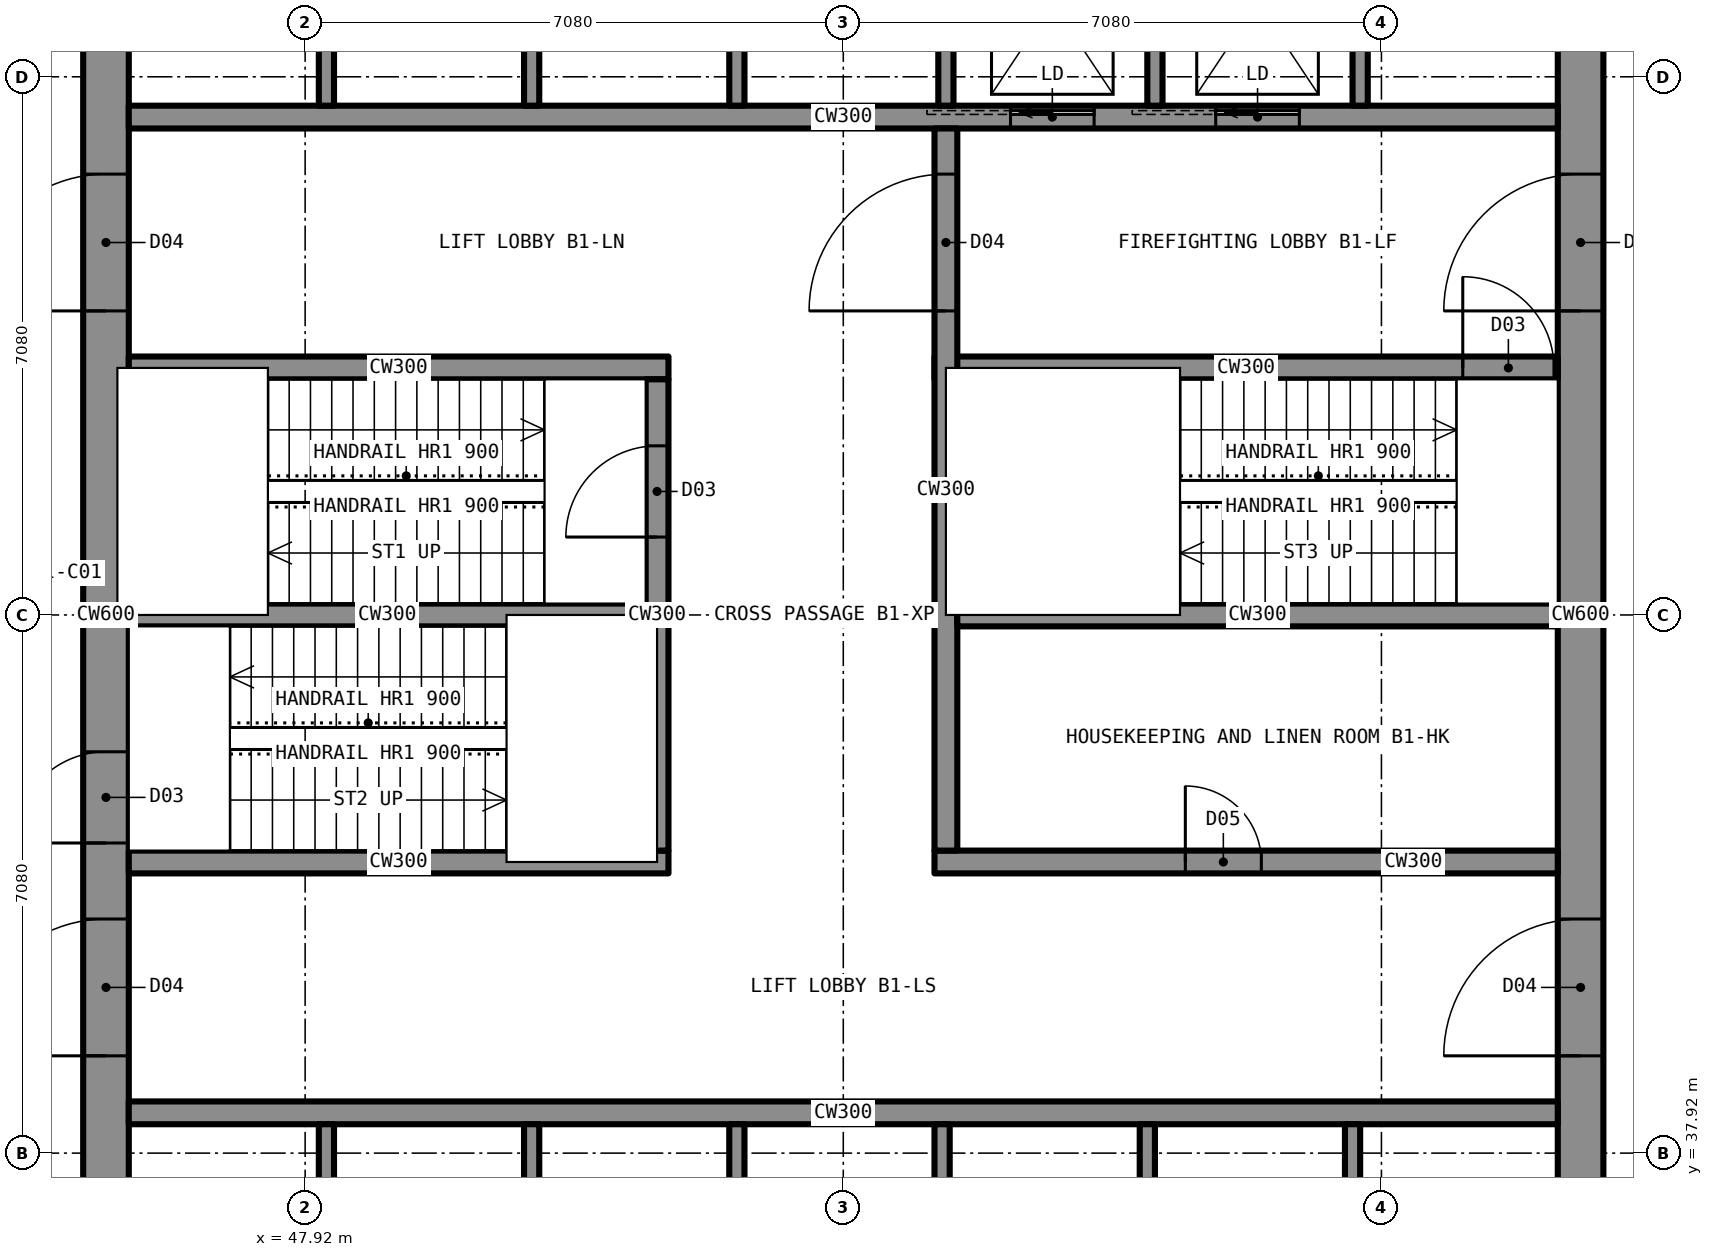
"""IFC4 building model, lengths in metres.
Left out: names, types, materials, properties, quantities, classifications, styles, units other than length and angle.
Written with IfcOpenShell. Run it as: python <this file> out.ifc"""

import sys

from ifc_helpers import new_model, si_unit, direction, frame, frame_2d, origin, place, context, subcontext, project, spatial, rectangle, extrude, element, fill, save


model = new_model("IFC4")
c1 = context("Model", 3, precision=1e-05, world=origin(), true_north=direction((0.0, 1.0)))
c2 = subcontext(c1, "Body", "Model", "MODEL_VIEW")
j1 = project(units=[si_unit("LENGTHUNIT", "METRE"), si_unit("PLANEANGLEUNIT", "RADIAN")], contexts=[c1])
p1 = place(None, origin())
s1 = spatial("IfcSite", under=j1, at=p1, CompositionType="ELEMENT")
p2 = place(p1, origin())
s2 = spatial("IfcBuilding", under=s1, at=p2, CompositionType="ELEMENT")
p3 = place(p2, frame((0.0, 0.0, -5.0)))
s3 = spatial("IfcBuildingStorey", under=s2, at=p3, CompositionType="ELEMENT", Elevation=-5.0)
p4 = place(p3, frame((64.7, 35.6, 0.0), z_axis=(0.0, 0.0, 1.0), x_axis=(0.0, 1.0, 0.0)))
e1 = element("IfcWall", 1, at=p4, inside=s3, PredefinedType="SHEAR", context=c2, shape_type="SweptSolid", body=[
    extrude(rectangle(XDim=18.8, YDim=0.6, at=frame_2d((9.4, 0.0))), origin(), (0.0, 0.0, 1.0), 5.0),
])
p5 = place(p4, frame((13.4, 0.0, 0.0)))
e2 = element("IfcOpeningElement", 2, at=p5, cuts=e1, PredefinedType="OPENING", context=c2, shape_type="SweptSolid", body=[
    extrude(rectangle(XDim=1.8, YDim=2.2, at=frame_2d((0.9, 1.1))), frame((0.0, 0.31, 0.0), z_axis=(0.0, -1.0, 0.0), x_axis=(1.0, 0.0, 0.0)), (0.0, 0.0, 1.0), 0.62),
])
p6 = place(p4, frame((3.6, 0.0, 0.0)))
e3 = element("IfcOpeningElement", 3, at=p6, cuts=e1, PredefinedType="OPENING", context=c2, shape_type="SweptSolid", body=[
    extrude(rectangle(XDim=1.8, YDim=2.2, at=frame_2d((0.9, 1.1))), frame((0.0, 0.31, 0.0), z_axis=(0.0, -1.0, 0.0), x_axis=(1.0, 0.0, 0.0)), (0.0, 0.0, 1.0), 0.62),
])
p7 = place(p3, frame((45.3, 35.6, 0.0), z_axis=(0.0, 0.0, 1.0), x_axis=(0.0, 1.0, 0.0)))
e4 = element("IfcWall", 4, at=p7, inside=s3, PredefinedType="SHEAR", context=c2, shape_type="SweptSolid", body=[
    extrude(rectangle(XDim=18.8, YDim=0.6, at=frame_2d((9.4, 0.0))), origin(), (0.0, 0.0, 1.0), 5.0),
])
p8 = place(p7, frame((13.4, 0.0, 0.0)))
e5 = element("IfcOpeningElement", 5, at=p8, cuts=e4, PredefinedType="OPENING", context=c2, shape_type="SweptSolid", body=[
    extrude(rectangle(XDim=1.8, YDim=2.2, at=frame_2d((0.9, 1.1))), frame((0.0, 0.31, 0.0), z_axis=(0.0, -1.0, 0.0), x_axis=(1.0, 0.0, 0.0)), (0.0, 0.0, 1.0), 0.62),
])
p9 = place(p7, frame((3.6, 0.0, 0.0)))
e6 = element("IfcOpeningElement", 6, at=p9, cuts=e4, PredefinedType="OPENING", context=c2, shape_type="SweptSolid", body=[
    extrude(rectangle(XDim=1.8, YDim=2.2, at=frame_2d((0.9, 1.1))), frame((0.0, 0.31, 0.0), z_axis=(0.0, -1.0, 0.0), x_axis=(1.0, 0.0, 0.0)), (0.0, 0.0, 1.0), 0.62),
])
p10 = place(p7, frame((6.4, 0.0, 0.0)))
e7 = element("IfcOpeningElement", 7, at=p10, cuts=e4, PredefinedType="OPENING", context=c2, shape_type="SweptSolid", body=[
    extrude(rectangle(XDim=1.2, YDim=2.2, at=frame_2d((0.6, 1.1))), frame((0.0, 0.31, 0.0), z_axis=(0.0, -1.0, 0.0), x_axis=(1.0, 0.0, 0.0)), (0.0, 0.0, 1.0), 0.62),
])
p11 = place(p3, frame((45.6, 51.55, 0.0), z_axis=(0.0, 0.0, 1.0), x_axis=(1.0, 0.0, 0.0)))
e8 = element("IfcWall", 8, at=p11, inside=s3, PredefinedType="SHEAR", context=c2, shape_type="SweptSolid", body=[
    extrude(rectangle(XDim=18.8, YDim=0.3, at=frame_2d((9.4, 0.0))), origin(), (0.0, 0.0, 1.0), 5.0),
])
p12 = place(p11, frame((11.6, 0.0, 0.0)))
e9 = element("IfcOpeningElement", 9, at=p12, cuts=e8, PredefinedType="OPENING", context=c2, shape_type="SweptSolid", body=[
    extrude(rectangle(XDim=1.1, YDim=2.2, at=frame_2d((0.55, 1.1))), frame((0.0, 0.16, 0.0), z_axis=(0.0, -1.0, 0.0), x_axis=(1.0, 0.0, 0.0)), (0.0, 0.0, 1.0), 0.32),
])
p13 = place(p11, frame((14.3, 0.0, 0.0)))
e10 = element("IfcOpeningElement", 10, at=p13, cuts=e8, PredefinedType="OPENING", context=c2, shape_type="SweptSolid", body=[
    extrude(rectangle(XDim=1.1, YDim=2.2, at=frame_2d((0.55, 1.1))), frame((0.0, 0.16, 0.0), z_axis=(0.0, -1.0, 0.0), x_axis=(1.0, 0.0, 0.0)), (0.0, 0.0, 1.0), 0.32),
])
p14 = place(p3, frame((45.6, 38.45, 0.0), z_axis=(0.0, 0.0, 1.0), x_axis=(1.0, 0.0, 0.0)))
e11 = element("IfcWall", 11, at=p14, inside=s3, PredefinedType="SHEAR", context=c2, shape_type="SweptSolid", body=[
    extrude(rectangle(XDim=18.8, YDim=0.3, at=frame_2d((9.4, 0.0))), origin(), (0.0, 0.0, 1.0), 5.0),
])
p15 = place(p3, frame((45.6, 48.25, 0.0), z_axis=(0.0, 0.0, 1.0), x_axis=(1.0, 0.0, 0.0)))
e12 = element("IfcWall", 12, at=p15, inside=s3, PredefinedType="SHEAR", context=c2, shape_type="SweptSolid", body=[
    extrude(rectangle(XDim=7.1, YDim=0.3, at=frame_2d((3.55, 0.0))), origin(), (0.0, 0.0, 1.0), 5.0),
])
p16 = place(p3, frame((56.2, 48.25, 0.0), z_axis=(0.0, 0.0, 1.0), x_axis=(1.0, 0.0, 0.0)))
e13 = element("IfcWall", 13, at=p16, inside=s3, PredefinedType="SHEAR", context=c2, shape_type="SweptSolid", body=[
    extrude(rectangle(XDim=8.2, YDim=0.3, at=frame_2d((4.1, 0.0))), origin(), (0.0, 0.0, 1.0), 5.0),
])
p17 = place(p16, frame((6.95, 0.0, 0.0)))
e14 = element("IfcOpeningElement", 14, at=p17, cuts=e13, PredefinedType="OPENING", context=c2, shape_type="SweptSolid", body=[
    extrude(rectangle(XDim=1.2, YDim=2.2, at=frame_2d((0.6, 1.1))), frame((0.0, 0.16, 0.0), z_axis=(0.0, -1.0, 0.0), x_axis=(1.0, 0.0, 0.0)), (0.0, 0.0, 1.0), 0.32),
])
p18 = place(p3, frame((45.6, 41.75, 0.0), z_axis=(0.0, 0.0, 1.0), x_axis=(1.0, 0.0, 0.0)))
e15 = element("IfcWall", 15, at=p18, inside=s3, PredefinedType="SHEAR", context=c2, shape_type="SweptSolid", body=[
    extrude(rectangle(XDim=7.1, YDim=0.3, at=frame_2d((3.55, 0.0))), origin(), (0.0, 0.0, 1.0), 5.0),
])
p19 = place(p3, frame((56.2, 41.75, 0.0), z_axis=(0.0, 0.0, 1.0), x_axis=(1.0, 0.0, 0.0)))
e16 = element("IfcWall", 16, at=p19, inside=s3, PredefinedType="SHEAR", context=c2, shape_type="SweptSolid", body=[
    extrude(rectangle(XDim=8.2, YDim=0.3, at=frame_2d((4.1, 0.0))), origin(), (0.0, 0.0, 1.0), 5.0),
])
p20 = place(p19, frame((3.3, 0.0, 0.0)))
e17 = element("IfcOpeningElement", 17, at=p20, cuts=e16, PredefinedType="OPENING", context=c2, shape_type="SweptSolid", body=[
    extrude(rectangle(XDim=1.0, YDim=2.1, at=frame_2d((0.5, 1.05))), frame((0.0, 0.16, 0.0), z_axis=(0.0, -1.0, 0.0), x_axis=(1.0, 0.0, 0.0)), (0.0, 0.0, 1.0), 0.32),
])
p21 = place(p3, frame((52.55, 41.9, 0.0), z_axis=(0.0, 0.0, 1.0), x_axis=(0.0, 1.0, 0.0)))
e18 = element("IfcWall", 18, at=p21, inside=s3, PredefinedType="SHEAR", context=c2, shape_type="SweptSolid", body=[
    extrude(rectangle(XDim=6.2, YDim=0.3, at=frame_2d((3.1, 0.0))), origin(), (0.0, 0.0, 1.0), 5.0),
])
p22 = place(p21, frame((4.125, 0.0, 0.0)))
e19 = element("IfcOpeningElement", 19, at=p22, cuts=e18, PredefinedType="OPENING", context=c2, shape_type="SweptSolid", body=[
    extrude(rectangle(XDim=1.2, YDim=2.2, at=frame_2d((0.6, 1.1))), frame((0.0, 0.16, 0.0), z_axis=(0.0, -1.0, 0.0), x_axis=(1.0, 0.0, 0.0)), (0.0, 0.0, 1.0), 0.32),
])
p23 = place(p3, frame((56.35, 41.9, 0.0), z_axis=(0.0, 0.0, 1.0), x_axis=(0.0, 1.0, 0.0)))
e20 = element("IfcWall", 20, at=p23, inside=s3, PredefinedType="SHEAR", context=c2, shape_type="SweptSolid", body=[
    extrude(rectangle(XDim=9.5, YDim=0.3, at=frame_2d((4.75, 0.0))), origin(), (0.0, 0.0, 1.0), 5.0),
])
p24 = place(p23, frame((7.1, 0.0, 0.0)))
e21 = element("IfcOpeningElement", 21, at=p24, cuts=e20, PredefinedType="OPENING", context=c2, shape_type="SweptSolid", body=[
    extrude(rectangle(XDim=1.8, YDim=2.2, at=frame_2d((0.9, 1.1))), frame((0.0, 0.16, 0.0), z_axis=(0.0, -1.0, 0.0), x_axis=(1.0, 0.0, 0.0)), (0.0, 0.0, 1.0), 0.32),
])
p25 = place(p3, frame((45.6, 45.0, 0.0), z_axis=(0.0, 0.0, 1.0), x_axis=(1.0, 0.0, 0.0)))
e22 = element("IfcWall", 22, at=p25, inside=s3, PredefinedType="SHEAR", context=c2, shape_type="SweptSolid", body=[
    extrude(rectangle(XDim=6.8, YDim=0.3, at=frame_2d((3.4, 0.0))), origin(), (0.0, 0.0, 1.0), 5.0),
])
p26 = place(p3, frame((56.5, 45.0, 0.0), z_axis=(0.0, 0.0, 1.0), x_axis=(1.0, 0.0, 0.0)))
e23 = element("IfcWall", 23, at=p26, inside=s3, PredefinedType="SHEAR", context=c2, shape_type="SweptSolid", body=[
    extrude(rectangle(XDim=7.9, YDim=0.3, at=frame_2d((3.95, 0.0))), origin(), (0.0, 0.0, 1.0), 5.0),
])
for number, where, z_axis, x_axis in (
    (24, (48.2, 51.7, 0.0), (0.0, 0.0, 1.0), (0.0, 1.0, 0.0)),
    (25, (50.9, 51.7, 0.0), (0.0, 0.0, 1.0), (0.0, 1.0, 0.0)),
    (26, (53.6, 51.7, 0.0), (0.0, 0.0, 1.0), (0.0, 1.0, 0.0)),
    (27, (59.1, 51.7, 0.0), (0.0, 0.0, 1.0), (0.0, 1.0, 0.0)),
    (28, (61.8, 51.7, 0.0), (0.0, 0.0, 1.0), (0.0, 1.0, 0.0)),
    (29, (56.35, 51.7, 0.0), (0.0, 0.0, 1.0), (0.0, 1.0, 0.0)),
    (30, (48.2, 35.6, 0.0), (0.0, 0.0, 1.0), (0.0, 1.0, 0.0)),
    (31, (50.9, 35.6, 0.0), (0.0, 0.0, 1.0), (0.0, 1.0, 0.0)),
    (32, (53.6, 35.6, 0.0), (0.0, 0.0, 1.0), (0.0, 1.0, 0.0)),
    (33, (56.3, 35.6, 0.0), (0.0, 0.0, 1.0), (0.0, 1.0, 0.0)),
    (34, (59.0, 35.6, 0.0), (0.0, 0.0, 1.0), (0.0, 1.0, 0.0)),
    (35, (61.7, 35.6, 0.0), (0.0, 0.0, 1.0), (0.0, 1.0, 0.0)),
):
    element("IfcWall", number, at=place(p3, frame(where, z_axis=z_axis, x_axis=x_axis)), inside=s3, PredefinedType="PARTITIONING", context=c2, shape_type="SweptSolid", body=[
        extrude(rectangle(XDim=2.7, YDim=0.2, at=frame_2d((1.35, 0.0))), origin(), (0.0, 0.0, 1.0), 4.6),
    ])
p27 = place(p8, origin())
e36 = element("IfcDoor", 36, at=p27, inside=s3, OperationType="DOUBLE_DOOR_SINGLE_SWING", PredefinedType="DOOR", context=c2, shape_type="SweptSolid", body=[
    extrude(rectangle(XDim=1.8, YDim=2.2, at=frame_2d((0.9, 1.1))), frame((0.0, 0.025, 0.0), z_axis=(0.0, -1.0, 0.0), x_axis=(1.0, 0.0, 0.0)), (0.0, 0.0, 1.0), 0.05),
])
fill(e5, e36)
p28 = place(p9, origin())
e37 = element("IfcDoor", 37, at=p28, inside=s3, OperationType="DOUBLE_DOOR_SINGLE_SWING", PredefinedType="DOOR", context=c2, shape_type="SweptSolid", body=[
    extrude(rectangle(XDim=1.8, YDim=2.2, at=frame_2d((0.9, 1.1))), frame((0.0, 0.025, 0.0), z_axis=(0.0, -1.0, 0.0), x_axis=(1.0, 0.0, 0.0)), (0.0, 0.0, 1.0), 0.05),
])
fill(e6, e37)
p29 = place(p5, origin())
e38 = element("IfcDoor", 38, at=p29, inside=s3, OperationType="DOUBLE_DOOR_SINGLE_SWING", PredefinedType="DOOR", context=c2, shape_type="SweptSolid", body=[
    extrude(rectangle(XDim=1.8, YDim=2.2, at=frame_2d((0.9, 1.1))), frame((0.0, 0.025, 0.0), z_axis=(0.0, -1.0, 0.0), x_axis=(1.0, 0.0, 0.0)), (0.0, 0.0, 1.0), 0.05),
])
fill(e2, e38)
p30 = place(p6, origin())
e39 = element("IfcDoor", 39, at=p30, inside=s3, OperationType="DOUBLE_DOOR_SINGLE_SWING", PredefinedType="DOOR", context=c2, shape_type="SweptSolid", body=[
    extrude(rectangle(XDim=1.8, YDim=2.2, at=frame_2d((0.9, 1.1))), frame((0.0, 0.025, 0.0), z_axis=(0.0, -1.0, 0.0), x_axis=(1.0, 0.0, 0.0)), (0.0, 0.0, 1.0), 0.05),
])
fill(e3, e39)
p31 = place(p24, origin())
e40 = element("IfcDoor", 40, at=p31, inside=s3, OperationType="DOUBLE_DOOR_SINGLE_SWING", PredefinedType="DOOR", context=c2, shape_type="SweptSolid", body=[
    extrude(rectangle(XDim=1.8, YDim=2.2, at=frame_2d((0.9, 1.1))), frame((0.0, 0.025, 0.0), z_axis=(0.0, -1.0, 0.0), x_axis=(1.0, 0.0, 0.0)), (0.0, 0.0, 1.0), 0.05),
])
fill(e21, e40)
p32 = place(p22, origin())
e41 = element("IfcDoor", 41, at=p32, inside=s3, OperationType="SINGLE_SWING_LEFT", PredefinedType="DOOR", context=c2, shape_type="SweptSolid", body=[
    extrude(rectangle(XDim=1.2, YDim=2.2, at=frame_2d((0.6, 1.1))), frame((0.0, 0.025, 0.0), z_axis=(0.0, -1.0, 0.0), x_axis=(1.0, 0.0, 0.0)), (0.0, 0.0, 1.0), 0.05),
])
fill(e19, e41)
p33 = place(p10, origin())
e42 = element("IfcDoor", 42, at=p33, inside=s3, OperationType="SINGLE_SWING_LEFT", PredefinedType="DOOR", context=c2, shape_type="SweptSolid", body=[
    extrude(rectangle(XDim=1.2, YDim=2.2, at=frame_2d((0.6, 1.1))), frame((0.0, 0.025, 0.0), z_axis=(0.0, -1.0, 0.0), x_axis=(1.0, 0.0, 0.0)), (0.0, 0.0, 1.0), 0.05),
])
fill(e7, e42)
p34 = place(p17, origin())
e43 = element("IfcDoor", 43, at=p34, inside=s3, OperationType="SINGLE_SWING_LEFT", PredefinedType="DOOR", context=c2, shape_type="SweptSolid", body=[
    extrude(rectangle(XDim=1.2, YDim=2.2, at=frame_2d((0.6, 1.1))), frame((0.0, 0.025, 0.0), z_axis=(0.0, -1.0, 0.0), x_axis=(1.0, 0.0, 0.0)), (0.0, 0.0, 1.0), 0.05),
])
fill(e14, e43)
p35 = place(p20, origin())
e44 = element("IfcDoor", 44, at=p35, inside=s3, OperationType="SINGLE_SWING_LEFT", PredefinedType="DOOR", context=c2, shape_type="SweptSolid", body=[
    extrude(rectangle(XDim=1.0, YDim=2.1, at=frame_2d((0.5, 1.05))), frame((0.0, 0.025, 0.0), z_axis=(0.0, -1.0, 0.0), x_axis=(1.0, 0.0, 0.0)), (0.0, 0.0, 1.0), 0.05),
])
fill(e17, e44)
p36 = place(p12, origin())
e45 = element("IfcDoor", 45, at=p36, inside=s3, OperationType="SLIDING_TO_LEFT", PredefinedType="DOOR", context=c2, shape_type="SweptSolid", body=[
    extrude(rectangle(XDim=1.1, YDim=2.2, at=frame_2d((0.55, 1.1))), frame((0.0, 0.025, 0.0), z_axis=(0.0, -1.0, 0.0), x_axis=(1.0, 0.0, 0.0)), (0.0, 0.0, 1.0), 0.05),
])
fill(e9, e45)
p37 = place(p13, origin())
e46 = element("IfcDoor", 46, at=p37, inside=s3, OperationType="SLIDING_TO_LEFT", PredefinedType="DOOR", context=c2, shape_type="SweptSolid", body=[
    extrude(rectangle(XDim=1.1, YDim=2.2, at=frame_2d((0.55, 1.1))), frame((0.0, 0.025, 0.0), z_axis=(0.0, -1.0, 0.0), x_axis=(1.0, 0.0, 0.0)), (0.0, 0.0, 1.0), 0.05),
])
fill(e10, e46)
save(model, sys.argv[1])
